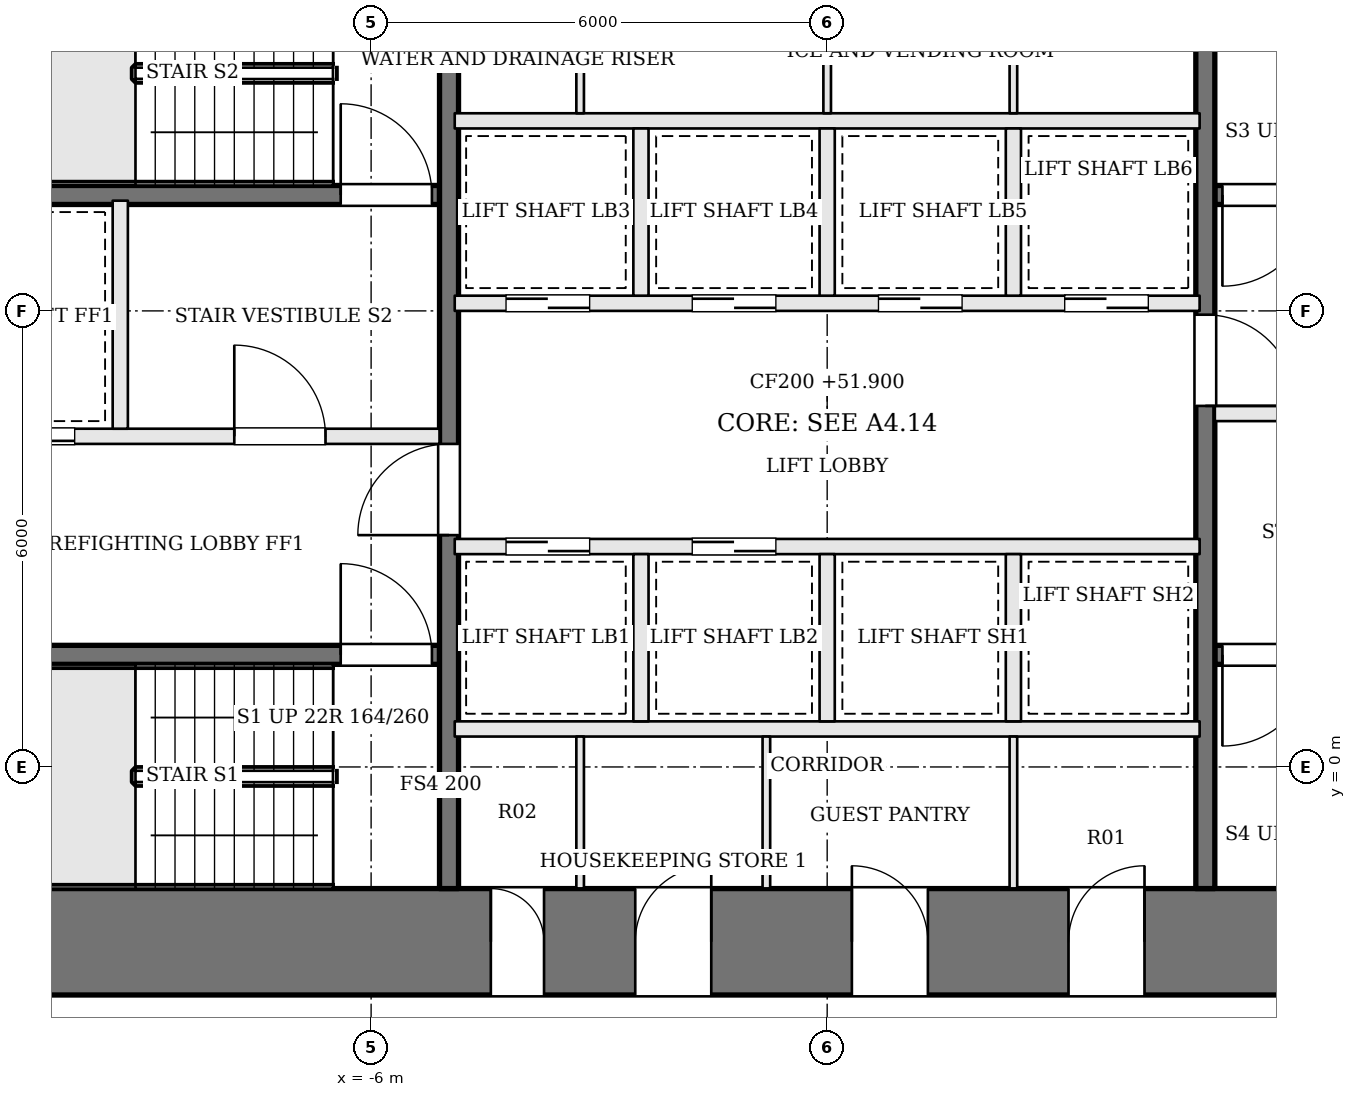
"""IFC4 building model, lengths in metres.
Left out: names, types, materials, properties, quantities, classifications, styles, units other than length and angle.
Written with IfcOpenShell. Run it as: python <this file> out.ifc"""

import sys

from ifc_helpers import new_model, si_unit, direction, frame, frame_2d, origin, place, context, subcontext, project, spatial, rectangle, extrude, element, fill, save


model = new_model("IFC4")
c1 = context("Model", 3, precision=1e-05, world=origin(), true_north=direction((0.0, 1.0)))
c2 = subcontext(c1, "Body", "Model", "MODEL_VIEW")
j1 = project(units=[si_unit("LENGTHUNIT", "METRE"), si_unit("PLANEANGLEUNIT", "RADIAN")], contexts=[c1])
p1 = place(None, origin())
s1 = spatial("IfcSite", under=j1, at=p1, CompositionType="ELEMENT")
p2 = place(p1, origin())
s2 = spatial("IfcBuilding", under=s1, at=p2, CompositionType="ELEMENT")
p3 = place(p2, frame((0.0, 0.0, 51.9)))
s3 = spatial("IfcBuildingStorey", under=s2, at=p3, CompositionType="ELEMENT", Elevation=51.9)
p4 = place(p3, frame((-13.0, -2.3, 0.0), z_axis=(0.0, 0.0, 1.0), x_axis=(1.0, 0.0, 0.0)))
e1 = element("IfcWall", 1, at=p4, inside=s3, PredefinedType="SHEAR", context=c2, shape_type="SweptSolid", body=[
    extrude(rectangle(XDim=26.0, YDim=1.4, at=frame_2d((13.0, 0.0))), origin(), (0.0, 0.0, 1.0), 3.6),
])
p5 = place(p4, frame((8.575, 0.0, 0.0)))
e2 = element("IfcOpeningElement", 2, at=p5, cuts=e1, PredefinedType="OPENING", context=c2, shape_type="SweptSolid", body=[
    extrude(rectangle(XDim=0.7, YDim=2.1, at=frame_2d((0.35, 1.05))), frame((0.0, 0.71, 0.0), z_axis=(0.0, -1.0, 0.0), x_axis=(1.0, 0.0, 0.0)), (0.0, 0.0, 1.0), 1.42),
])
p6 = place(p4, frame((10.475, 0.0, 0.0)))
e3 = element("IfcOpeningElement", 3, at=p6, cuts=e1, PredefinedType="OPENING", context=c2, shape_type="SweptSolid", body=[
    extrude(rectangle(XDim=1.0, YDim=2.1, at=frame_2d((0.5, 1.05))), frame((0.0, 0.71, 0.0), z_axis=(0.0, -1.0, 0.0), x_axis=(1.0, 0.0, 0.0)), (0.0, 0.0, 1.0), 1.42),
])
p7 = place(p4, frame((13.325, 0.0, 0.0)))
e4 = element("IfcOpeningElement", 4, at=p7, cuts=e1, PredefinedType="OPENING", context=c2, shape_type="SweptSolid", body=[
    extrude(rectangle(XDim=1.0, YDim=2.1, at=frame_2d((0.5, 1.05))), frame((0.0, 0.71, 0.0), z_axis=(0.0, -1.0, 0.0), x_axis=(1.0, 0.0, 0.0)), (0.0, 0.0, 1.0), 1.42),
])
p8 = place(p4, frame((16.175, 0.0, 0.0)))
e5 = element("IfcOpeningElement", 5, at=p8, cuts=e1, PredefinedType="OPENING", context=c2, shape_type="SweptSolid", body=[
    extrude(rectangle(XDim=1.0, YDim=2.1, at=frame_2d((0.5, 1.05))), frame((0.0, 0.71, 0.0), z_axis=(0.0, -1.0, 0.0), x_axis=(1.0, 0.0, 0.0)), (0.0, 0.0, 1.0), 1.42),
])
p9 = place(p3, frame((-11.6, 1.475, 0.0), z_axis=(0.0, 0.0, 1.0), x_axis=(1.0, 0.0, 0.0)))
e6 = element("IfcWall", 6, at=p9, inside=s3, PredefinedType="SOLIDWALL", context=c2, shape_type="SweptSolid", body=[
    extrude(rectangle(XDim=6.5, YDim=0.25, at=frame_2d((3.25, 0.0))), origin(), (0.0, 0.0, 1.0), 3.4),
])
p10 = place(p9, frame((5.2, 0.0, 0.0)))
e7 = element("IfcOpeningElement", 7, at=p10, cuts=e6, PredefinedType="OPENING", context=c2, shape_type="SweptSolid", body=[
    extrude(rectangle(XDim=1.2, YDim=2.1, at=frame_2d((0.6, 1.05))), frame((0.0, 0.135, 0.0), z_axis=(0.0, -1.0, 0.0), x_axis=(1.0, 0.0, 0.0)), (0.0, 0.0, 1.0), 0.27),
])
p11 = place(p3, frame((11.6, 7.525, 0.0), z_axis=(0.0, 0.0, 1.0), x_axis=(-1.0, 0.0, 0.0)))
e8 = element("IfcWall", 8, at=p11, inside=s3, PredefinedType="SOLIDWALL", context=c2, shape_type="SweptSolid", body=[
    extrude(rectangle(XDim=6.5, YDim=0.25, at=frame_2d((3.25, 0.0))), origin(), (0.0, 0.0, 1.0), 3.4),
])
p12 = place(p11, frame((5.2, 0.0, 0.0)))
e9 = element("IfcOpeningElement", 9, at=p12, cuts=e8, PredefinedType="OPENING", context=c2, shape_type="SweptSolid", body=[
    extrude(rectangle(XDim=1.2, YDim=2.1, at=frame_2d((0.6, 1.05))), frame((0.0, 0.135, 0.0), z_axis=(0.0, -1.0, 0.0), x_axis=(1.0, 0.0, 0.0)), (0.0, 0.0, 1.0), 0.27),
])
p13 = place(p3, frame((-11.6, 4.35, 0.0), z_axis=(0.0, 0.0, 1.0), x_axis=(1.0, 0.0, 0.0)))
e10 = element("IfcWall", 10, at=p13, inside=s3, PredefinedType="SOLIDWALL", context=c2, shape_type="SweptSolid", body=[
    extrude(rectangle(XDim=6.5, YDim=0.2, at=frame_2d((3.25, 0.0))), origin(), (0.0, 0.0, 1.0), 3.4),
])
p14 = place(p13, frame((3.8, 0.0, 0.0)))
e11 = element("IfcOpeningElement", 11, at=p14, cuts=e10, PredefinedType="OPENING", context=c2, shape_type="SweptSolid", body=[
    extrude(rectangle(XDim=1.2, YDim=2.1, at=frame_2d((0.6, 1.05))), frame((0.0, 0.11, 0.0), z_axis=(0.0, -1.0, 0.0), x_axis=(1.0, 0.0, 0.0)), (0.0, 0.0, 1.0), 0.22),
])
p15 = place(p13, frame((0.5, 0.0, 0.0)))
e12 = element("IfcOpeningElement", 12, at=p15, cuts=e10, PredefinedType="OPENING", context=c2, shape_type="SweptSolid", body=[
    extrude(rectangle(XDim=1.2, YDim=2.1, at=frame_2d((0.6, 1.05))), frame((0.0, 0.11, 0.0), z_axis=(0.0, -1.0, 0.0), x_axis=(1.0, 0.0, 0.0)), (0.0, 0.0, 1.0), 0.22),
])
p16 = place(p3, frame((11.6, 4.65, 0.0), z_axis=(0.0, 0.0, 1.0), x_axis=(-1.0, 0.0, 0.0)))
e13 = element("IfcWall", 13, at=p16, inside=s3, PredefinedType="SOLIDWALL", context=c2, shape_type="SweptSolid", body=[
    extrude(rectangle(XDim=6.5, YDim=0.2, at=frame_2d((3.25, 0.0))), origin(), (0.0, 0.0, 1.0), 3.4),
])
p17 = place(p16, frame((3.8, 0.0, 0.0)))
e14 = element("IfcOpeningElement", 14, at=p17, cuts=e13, PredefinedType="OPENING", context=c2, shape_type="SweptSolid", body=[
    extrude(rectangle(XDim=1.2, YDim=2.1, at=frame_2d((0.6, 1.05))), frame((0.0, 0.11, 0.0), z_axis=(0.0, -1.0, 0.0), x_axis=(1.0, 0.0, 0.0)), (0.0, 0.0, 1.0), 0.22),
])
p18 = place(p16, frame((0.5, 0.0, 0.0)))
e15 = element("IfcOpeningElement", 15, at=p18, cuts=e13, PredefinedType="OPENING", context=c2, shape_type="SweptSolid", body=[
    extrude(rectangle(XDim=1.2, YDim=2.1, at=frame_2d((0.6, 1.05))), frame((0.0, 0.11, 0.0), z_axis=(0.0, -1.0, 0.0), x_axis=(1.0, 0.0, 0.0)), (0.0, 0.0, 1.0), 0.22),
])
p19 = place(p3, frame((-11.6, 7.525, 0.0), z_axis=(0.0, 0.0, 1.0), x_axis=(1.0, 0.0, 0.0)))
e16 = element("IfcWall", 16, at=p19, inside=s3, PredefinedType="SOLIDWALL", context=c2, shape_type="SweptSolid", body=[
    extrude(rectangle(XDim=6.5, YDim=0.25, at=frame_2d((3.25, 0.0))), origin(), (0.0, 0.0, 1.0), 3.4),
])
p20 = place(p19, frame((5.2, 0.0, 0.0)))
e17 = element("IfcOpeningElement", 17, at=p20, cuts=e16, PredefinedType="OPENING", context=c2, shape_type="SweptSolid", body=[
    extrude(rectangle(XDim=1.2, YDim=2.1, at=frame_2d((0.6, 1.05))), frame((0.0, 0.135, 0.0), z_axis=(0.0, -1.0, 0.0), x_axis=(1.0, 0.0, 0.0)), (0.0, 0.0, 1.0), 0.27),
])
p21 = place(p3, frame((11.6, 1.475, 0.0), z_axis=(0.0, 0.0, 1.0), x_axis=(-1.0, 0.0, 0.0)))
e18 = element("IfcWall", 18, at=p21, inside=s3, PredefinedType="SOLIDWALL", context=c2, shape_type="SweptSolid", body=[
    extrude(rectangle(XDim=6.5, YDim=0.25, at=frame_2d((3.25, 0.0))), origin(), (0.0, 0.0, 1.0), 3.4),
])
p22 = place(p21, frame((5.2, 0.0, 0.0)))
e19 = element("IfcOpeningElement", 19, at=p22, cuts=e18, PredefinedType="OPENING", context=c2, shape_type="SweptSolid", body=[
    extrude(rectangle(XDim=1.2, YDim=2.1, at=frame_2d((0.6, 1.05))), frame((0.0, 0.135, 0.0), z_axis=(0.0, -1.0, 0.0), x_axis=(1.0, 0.0, 0.0)), (0.0, 0.0, 1.0), 0.27),
])
p23 = place(p3, frame((-9.3, 4.45, 0.0), z_axis=(0.0, 0.0, 1.0), x_axis=(0.0, 1.0, 0.0)))
e20 = element("IfcWall", 20, at=p23, inside=s3, PredefinedType="SOLIDWALL", context=c2, shape_type="SweptSolid", body=[
    extrude(rectangle(XDim=3.0, YDim=0.2, at=frame_2d((1.5, 0.0))), origin(), (0.0, 0.0, 1.0), 3.4),
])
p24 = place(p3, frame((-4.975, -1.6, 0.0), z_axis=(0.0, 0.0, 1.0), x_axis=(0.0, 1.0, 0.0)))
e21 = element("IfcWall", 21, at=p24, inside=s3, PredefinedType="SOLIDWALL", context=c2, shape_type="SweptSolid", body=[
    extrude(rectangle(XDim=12.2, YDim=0.25, at=frame_2d((6.1, 0.0))), origin(), (0.0, 0.0, 1.0), 3.4),
])
p25 = place(p24, frame((4.65, 0.0, 0.0)))
e22 = element("IfcOpeningElement", 22, at=p25, cuts=e21, PredefinedType="OPENING", context=c2, shape_type="SweptSolid", body=[
    extrude(rectangle(XDim=1.2, YDim=2.1, at=frame_2d((0.6, 1.05))), frame((0.0, 0.135, 0.0), z_axis=(0.0, -1.0, 0.0), x_axis=(1.0, 0.0, 0.0)), (0.0, 0.0, 1.0), 0.27),
])
p26 = place(p3, frame((4.975, 10.6, 0.0), z_axis=(0.0, 0.0, 1.0), x_axis=(0.0, -1.0, 0.0)))
e23 = element("IfcWall", 23, at=p26, inside=s3, PredefinedType="SOLIDWALL", context=c2, shape_type="SweptSolid", body=[
    extrude(rectangle(XDim=12.2, YDim=0.25, at=frame_2d((6.1, 0.0))), origin(), (0.0, 0.0, 1.0), 3.4),
])
p27 = place(p26, frame((4.65, 0.0, 0.0)))
e24 = element("IfcOpeningElement", 24, at=p27, cuts=e23, PredefinedType="OPENING", context=c2, shape_type="SweptSolid", body=[
    extrude(rectangle(XDim=1.2, YDim=2.1, at=frame_2d((0.6, 1.05))), frame((0.0, 0.135, 0.0), z_axis=(0.0, -1.0, 0.0), x_axis=(1.0, 0.0, 0.0)), (0.0, 0.0, 1.0), 0.27),
])
p28 = place(p3, frame((-4.9, 0.5, 0.0), z_axis=(0.0, 0.0, 1.0), x_axis=(1.0, 0.0, 0.0)))
e25 = element("IfcWall", 25, at=p28, inside=s3, PredefinedType="SOLIDWALL", context=c2, shape_type="SweptSolid", body=[
    extrude(rectangle(XDim=9.8, YDim=0.2, at=frame_2d((4.9, 0.0))), origin(), (0.0, 0.0, 1.0), 3.4),
])
p29 = place(p3, frame((-4.9, 2.9, 0.0), z_axis=(0.0, 0.0, 1.0), x_axis=(1.0, 0.0, 0.0)))
e26 = element("IfcWall", 26, at=p29, inside=s3, PredefinedType="SOLIDWALL", context=c2, shape_type="SweptSolid", body=[
    extrude(rectangle(XDim=9.8, YDim=0.2, at=frame_2d((4.9, 0.0))), origin(), (0.0, 0.0, 1.0), 3.4),
])
p30 = place(p29, frame((0.675, 0.0, 0.0)))
e27 = element("IfcOpeningElement", 27, at=p30, cuts=e26, PredefinedType="OPENING", context=c2, shape_type="SweptSolid", body=[
    extrude(rectangle(XDim=1.1, YDim=2.1, at=frame_2d((0.55, 1.05))), frame((0.0, 0.11, 0.0), z_axis=(0.0, -1.0, 0.0), x_axis=(1.0, 0.0, 0.0)), (0.0, 0.0, 1.0), 0.22),
])
p31 = place(p29, frame((3.125, 0.0, 0.0)))
e28 = element("IfcOpeningElement", 28, at=p31, cuts=e26, PredefinedType="OPENING", context=c2, shape_type="SweptSolid", body=[
    extrude(rectangle(XDim=1.1, YDim=2.1, at=frame_2d((0.55, 1.05))), frame((0.0, 0.11, 0.0), z_axis=(0.0, -1.0, 0.0), x_axis=(1.0, 0.0, 0.0)), (0.0, 0.0, 1.0), 0.22),
])
p32 = place(p3, frame((-4.9, 6.1, 0.0), z_axis=(0.0, 0.0, 1.0), x_axis=(1.0, 0.0, 0.0)))
e29 = element("IfcWall", 29, at=p32, inside=s3, PredefinedType="SOLIDWALL", context=c2, shape_type="SweptSolid", body=[
    extrude(rectangle(XDim=9.8, YDim=0.2, at=frame_2d((4.9, 0.0))), origin(), (0.0, 0.0, 1.0), 3.4),
])
p33 = place(p32, frame((0.675, 0.0, 0.0)))
e30 = element("IfcOpeningElement", 30, at=p33, cuts=e29, PredefinedType="OPENING", context=c2, shape_type="SweptSolid", body=[
    extrude(rectangle(XDim=1.1, YDim=2.1, at=frame_2d((0.55, 1.05))), frame((0.0, 0.11, 0.0), z_axis=(0.0, -1.0, 0.0), x_axis=(1.0, 0.0, 0.0)), (0.0, 0.0, 1.0), 0.22),
])
p34 = place(p32, frame((3.125, 0.0, 0.0)))
e31 = element("IfcOpeningElement", 31, at=p34, cuts=e29, PredefinedType="OPENING", context=c2, shape_type="SweptSolid", body=[
    extrude(rectangle(XDim=1.1, YDim=2.1, at=frame_2d((0.55, 1.05))), frame((0.0, 0.11, 0.0), z_axis=(0.0, -1.0, 0.0), x_axis=(1.0, 0.0, 0.0)), (0.0, 0.0, 1.0), 0.22),
])
p35 = place(p32, frame((5.575, 0.0, 0.0)))
e32 = element("IfcOpeningElement", 32, at=p35, cuts=e29, PredefinedType="OPENING", context=c2, shape_type="SweptSolid", body=[
    extrude(rectangle(XDim=1.1, YDim=2.1, at=frame_2d((0.55, 1.05))), frame((0.0, 0.11, 0.0), z_axis=(0.0, -1.0, 0.0), x_axis=(1.0, 0.0, 0.0)), (0.0, 0.0, 1.0), 0.22),
])
p36 = place(p32, frame((8.025, 0.0, 0.0)))
e33 = element("IfcOpeningElement", 33, at=p36, cuts=e29, PredefinedType="OPENING", context=c2, shape_type="SweptSolid", body=[
    extrude(rectangle(XDim=1.1, YDim=2.1, at=frame_2d((0.55, 1.05))), frame((0.0, 0.11, 0.0), z_axis=(0.0, -1.0, 0.0), x_axis=(1.0, 0.0, 0.0)), (0.0, 0.0, 1.0), 0.22),
])
p37 = place(p3, frame((-4.9, 8.5, 0.0), z_axis=(0.0, 0.0, 1.0), x_axis=(1.0, 0.0, 0.0)))
e34 = element("IfcWall", 34, at=p37, inside=s3, PredefinedType="SOLIDWALL", context=c2, shape_type="SweptSolid", body=[
    extrude(rectangle(XDim=9.8, YDim=0.2, at=frame_2d((4.9, 0.0))), origin(), (0.0, 0.0, 1.0), 3.4),
])
for number, where, z_axis, x_axis in (
    (35, (-2.45, 0.6, 0.0), (0.0, 0.0, 1.0), (0.0, 1.0, 0.0)),
    (36, (0.0, 0.6, 0.0), (0.0, 0.0, 1.0), (0.0, 1.0, 0.0)),
    (37, (2.45, 0.6, 0.0), (0.0, 0.0, 1.0), (0.0, 1.0, 0.0)),
    (38, (-2.45, 6.2, 0.0), (0.0, 0.0, 1.0), (0.0, 1.0, 0.0)),
    (39, (0.0, 6.2, 0.0), (0.0, 0.0, 1.0), (0.0, 1.0, 0.0)),
    (40, (2.45, 6.2, 0.0), (0.0, 0.0, 1.0), (0.0, 1.0, 0.0)),
):
    element("IfcWall", number, at=place(p3, frame(where, z_axis=z_axis, x_axis=x_axis)), inside=s3, PredefinedType="SOLIDWALL", context=c2, shape_type="SweptSolid", body=[
        extrude(rectangle(XDim=2.2, YDim=0.2, at=frame_2d((1.1, 0.0))), origin(), (0.0, 0.0, 1.0), 3.4),
    ])
for number, where, z_axis, x_axis in (
    (41, (-3.25, -1.6, 0.0), (0.0, 0.0, 1.0), (0.0, 1.0, 0.0)),
    (42, (-0.8, -1.6, 0.0), (0.0, 0.0, 1.0), (0.0, 1.0, 0.0)),
    (43, (2.45, -1.6, 0.0), (0.0, 0.0, 1.0), (0.0, 1.0, 0.0)),
    (44, (-3.25, 8.6, 0.0), (0.0, 0.0, 1.0), (0.0, 1.0, 0.0)),
    (45, (0.0, 8.6, 0.0), (0.0, 0.0, 1.0), (0.0, 1.0, 0.0)),
    (46, (2.45, 8.6, 0.0), (0.0, 0.0, 1.0), (0.0, 1.0, 0.0)),
):
    element("IfcWall", number, at=place(p3, frame(where, z_axis=z_axis, x_axis=x_axis)), inside=s3, PredefinedType="PARTITIONING", context=c2, shape_type="SweptSolid", body=[
        extrude(rectangle(XDim=2.0, YDim=0.1, at=frame_2d((1.0, 0.0))), origin(), (0.0, 0.0, 1.0), 3.4),
    ])
p38 = place(p25, origin())
e47 = element("IfcDoor", 47, at=p38, inside=s3, OperationType="SINGLE_SWING_LEFT", PredefinedType="DOOR", context=c2, shape_type="SweptSolid", body=[
    extrude(rectangle(XDim=1.2, YDim=2.1, at=frame_2d((0.6, 1.05))), frame((0.0, 0.025, 0.0), z_axis=(0.0, -1.0, 0.0), x_axis=(1.0, 0.0, 0.0)), (0.0, 0.0, 1.0), 0.05),
])
fill(e22, e47)
p39 = place(p27, origin())
e48 = element("IfcDoor", 48, at=p39, inside=s3, OperationType="SINGLE_SWING_RIGHT", PredefinedType="DOOR", context=c2, shape_type="SweptSolid", body=[
    extrude(rectangle(XDim=1.2, YDim=2.1, at=frame_2d((0.6, 1.05))), frame((0.0, 0.025, 0.0), z_axis=(0.0, -1.0, 0.0), x_axis=(1.0, 0.0, 0.0)), (0.0, 0.0, 1.0), 0.05),
])
fill(e24, e48)
p40 = place(p14, origin())
e49 = element("IfcDoor", 49, at=p40, inside=s3, OperationType="SINGLE_SWING_LEFT", PredefinedType="DOOR", context=c2, shape_type="SweptSolid", body=[
    extrude(rectangle(XDim=1.2, YDim=2.1, at=frame_2d((0.6, 1.05))), frame((0.0, 0.025, 0.0), z_axis=(0.0, -1.0, 0.0), x_axis=(1.0, 0.0, 0.0)), (0.0, 0.0, 1.0), 0.05),
])
fill(e11, e49)
p41 = place(p10, origin())
e50 = element("IfcDoor", 50, at=p41, inside=s3, OperationType="SINGLE_SWING_LEFT", PredefinedType="DOOR", context=c2, shape_type="SweptSolid", body=[
    extrude(rectangle(XDim=1.2, YDim=2.1, at=frame_2d((0.6, 1.05))), frame((0.0, 0.025, 0.0), z_axis=(0.0, -1.0, 0.0), x_axis=(1.0, 0.0, 0.0)), (0.0, 0.0, 1.0), 0.05),
])
fill(e7, e50)
p42 = place(p12, origin())
e51 = element("IfcDoor", 51, at=p42, inside=s3, OperationType="SINGLE_SWING_RIGHT", PredefinedType="DOOR", context=c2, shape_type="SweptSolid", body=[
    extrude(rectangle(XDim=1.2, YDim=2.1, at=frame_2d((0.6, 1.05))), frame((0.0, 0.025, 0.0), z_axis=(0.0, -1.0, 0.0), x_axis=(1.0, 0.0, 0.0)), (0.0, 0.0, 1.0), 0.05),
])
fill(e9, e51)
p43 = place(p20, origin())
e52 = element("IfcDoor", 52, at=p43, inside=s3, OperationType="SINGLE_SWING_LEFT", PredefinedType="DOOR", context=c2, shape_type="SweptSolid", body=[
    extrude(rectangle(XDim=1.2, YDim=2.1, at=frame_2d((0.6, 1.05))), frame((0.0, 0.025, 0.0), z_axis=(0.0, -1.0, 0.0), x_axis=(1.0, 0.0, 0.0)), (0.0, 0.0, 1.0), 0.05),
])
fill(e17, e52)
p44 = place(p22, origin())
e53 = element("IfcDoor", 53, at=p44, inside=s3, OperationType="SINGLE_SWING_RIGHT", PredefinedType="DOOR", context=c2, shape_type="SweptSolid", body=[
    extrude(rectangle(XDim=1.2, YDim=2.1, at=frame_2d((0.6, 1.05))), frame((0.0, 0.025, 0.0), z_axis=(0.0, -1.0, 0.0), x_axis=(1.0, 0.0, 0.0)), (0.0, 0.0, 1.0), 0.05),
])
fill(e19, e53)
p45 = place(p15, origin())
e54 = element("IfcDoor", 54, at=p45, inside=s3, OperationType="SLIDING_TO_RIGHT", PredefinedType="DOOR", context=c2, shape_type="SweptSolid", body=[
    extrude(rectangle(XDim=1.2, YDim=2.1, at=frame_2d((0.6, 1.05))), frame((0.0, 0.025, 0.0), z_axis=(0.0, -1.0, 0.0), x_axis=(1.0, 0.0, 0.0)), (0.0, 0.0, 1.0), 0.05),
])
fill(e12, e54)
p46 = place(p30, origin())
e55 = element("IfcDoor", 55, at=p46, inside=s3, OperationType="SLIDING_TO_RIGHT", PredefinedType="DOOR", context=c2, shape_type="SweptSolid", body=[
    extrude(rectangle(XDim=1.1, YDim=2.1, at=frame_2d((0.55, 1.05))), frame((0.0, 0.025, 0.0), z_axis=(0.0, -1.0, 0.0), x_axis=(1.0, 0.0, 0.0)), (0.0, 0.0, 1.0), 0.05),
])
fill(e27, e55)
p47 = place(p31, origin())
e56 = element("IfcDoor", 56, at=p47, inside=s3, OperationType="SLIDING_TO_LEFT", PredefinedType="DOOR", context=c2, shape_type="SweptSolid", body=[
    extrude(rectangle(XDim=1.1, YDim=2.1, at=frame_2d((0.55, 1.05))), frame((0.0, 0.025, 0.0), z_axis=(0.0, -1.0, 0.0), x_axis=(1.0, 0.0, 0.0)), (0.0, 0.0, 1.0), 0.05),
])
fill(e28, e56)
p48 = place(p33, origin())
e57 = element("IfcDoor", 57, at=p48, inside=s3, OperationType="SLIDING_TO_RIGHT", PredefinedType="DOOR", context=c2, shape_type="SweptSolid", body=[
    extrude(rectangle(XDim=1.1, YDim=2.1, at=frame_2d((0.55, 1.05))), frame((0.0, 0.025, 0.0), z_axis=(0.0, -1.0, 0.0), x_axis=(1.0, 0.0, 0.0)), (0.0, 0.0, 1.0), 0.05),
])
fill(e30, e57)
p49 = place(p34, origin())
e58 = element("IfcDoor", 58, at=p49, inside=s3, OperationType="SLIDING_TO_LEFT", PredefinedType="DOOR", context=c2, shape_type="SweptSolid", body=[
    extrude(rectangle(XDim=1.1, YDim=2.1, at=frame_2d((0.55, 1.05))), frame((0.0, 0.025, 0.0), z_axis=(0.0, -1.0, 0.0), x_axis=(1.0, 0.0, 0.0)), (0.0, 0.0, 1.0), 0.05),
])
fill(e31, e58)
p50 = place(p35, origin())
e59 = element("IfcDoor", 59, at=p50, inside=s3, OperationType="SLIDING_TO_RIGHT", PredefinedType="DOOR", context=c2, shape_type="SweptSolid", body=[
    extrude(rectangle(XDim=1.1, YDim=2.1, at=frame_2d((0.55, 1.05))), frame((0.0, 0.025, 0.0), z_axis=(0.0, -1.0, 0.0), x_axis=(1.0, 0.0, 0.0)), (0.0, 0.0, 1.0), 0.05),
])
fill(e32, e59)
p51 = place(p36, origin())
e60 = element("IfcDoor", 60, at=p51, inside=s3, OperationType="SLIDING_TO_LEFT", PredefinedType="DOOR", context=c2, shape_type="SweptSolid", body=[
    extrude(rectangle(XDim=1.1, YDim=2.1, at=frame_2d((0.55, 1.05))), frame((0.0, 0.025, 0.0), z_axis=(0.0, -1.0, 0.0), x_axis=(1.0, 0.0, 0.0)), (0.0, 0.0, 1.0), 0.05),
])
fill(e33, e60)
p52 = place(p5, origin())
e61 = element("IfcDoor", 61, at=p52, inside=s3, OperationType="SINGLE_SWING_LEFT", PredefinedType="DOOR", context=c2, shape_type="SweptSolid", body=[
    extrude(rectangle(XDim=0.7, YDim=2.1, at=frame_2d((0.35, 1.05))), frame((0.0, 0.025, 0.0), z_axis=(0.0, -1.0, 0.0), x_axis=(1.0, 0.0, 0.0)), (0.0, 0.0, 1.0), 0.05),
])
fill(e2, e61)
p53 = place(p6, origin())
e62 = element("IfcDoor", 62, at=p53, inside=s3, OperationType="SINGLE_SWING_RIGHT", PredefinedType="DOOR", context=c2, shape_type="SweptSolid", body=[
    extrude(rectangle(XDim=1.0, YDim=2.1, at=frame_2d((0.5, 1.05))), frame((0.0, 0.025, 0.0), z_axis=(0.0, -1.0, 0.0), x_axis=(1.0, 0.0, 0.0)), (0.0, 0.0, 1.0), 0.05),
])
fill(e3, e62)
p54 = place(p7, origin())
e63 = element("IfcDoor", 63, at=p54, inside=s3, OperationType="SINGLE_SWING_LEFT", PredefinedType="DOOR", context=c2, shape_type="SweptSolid", body=[
    extrude(rectangle(XDim=1.0, YDim=2.1, at=frame_2d((0.5, 1.05))), frame((0.0, 0.025, 0.0), z_axis=(0.0, -1.0, 0.0), x_axis=(1.0, 0.0, 0.0)), (0.0, 0.0, 1.0), 0.05),
])
fill(e4, e63)
p55 = place(p8, origin())
e64 = element("IfcDoor", 64, at=p55, inside=s3, OperationType="SINGLE_SWING_RIGHT", PredefinedType="DOOR", context=c2, shape_type="SweptSolid", body=[
    extrude(rectangle(XDim=1.0, YDim=2.1, at=frame_2d((0.5, 1.05))), frame((0.0, 0.025, 0.0), z_axis=(0.0, -1.0, 0.0), x_axis=(1.0, 0.0, 0.0)), (0.0, 0.0, 1.0), 0.05),
])
fill(e5, e64)
save(model, sys.argv[1])
